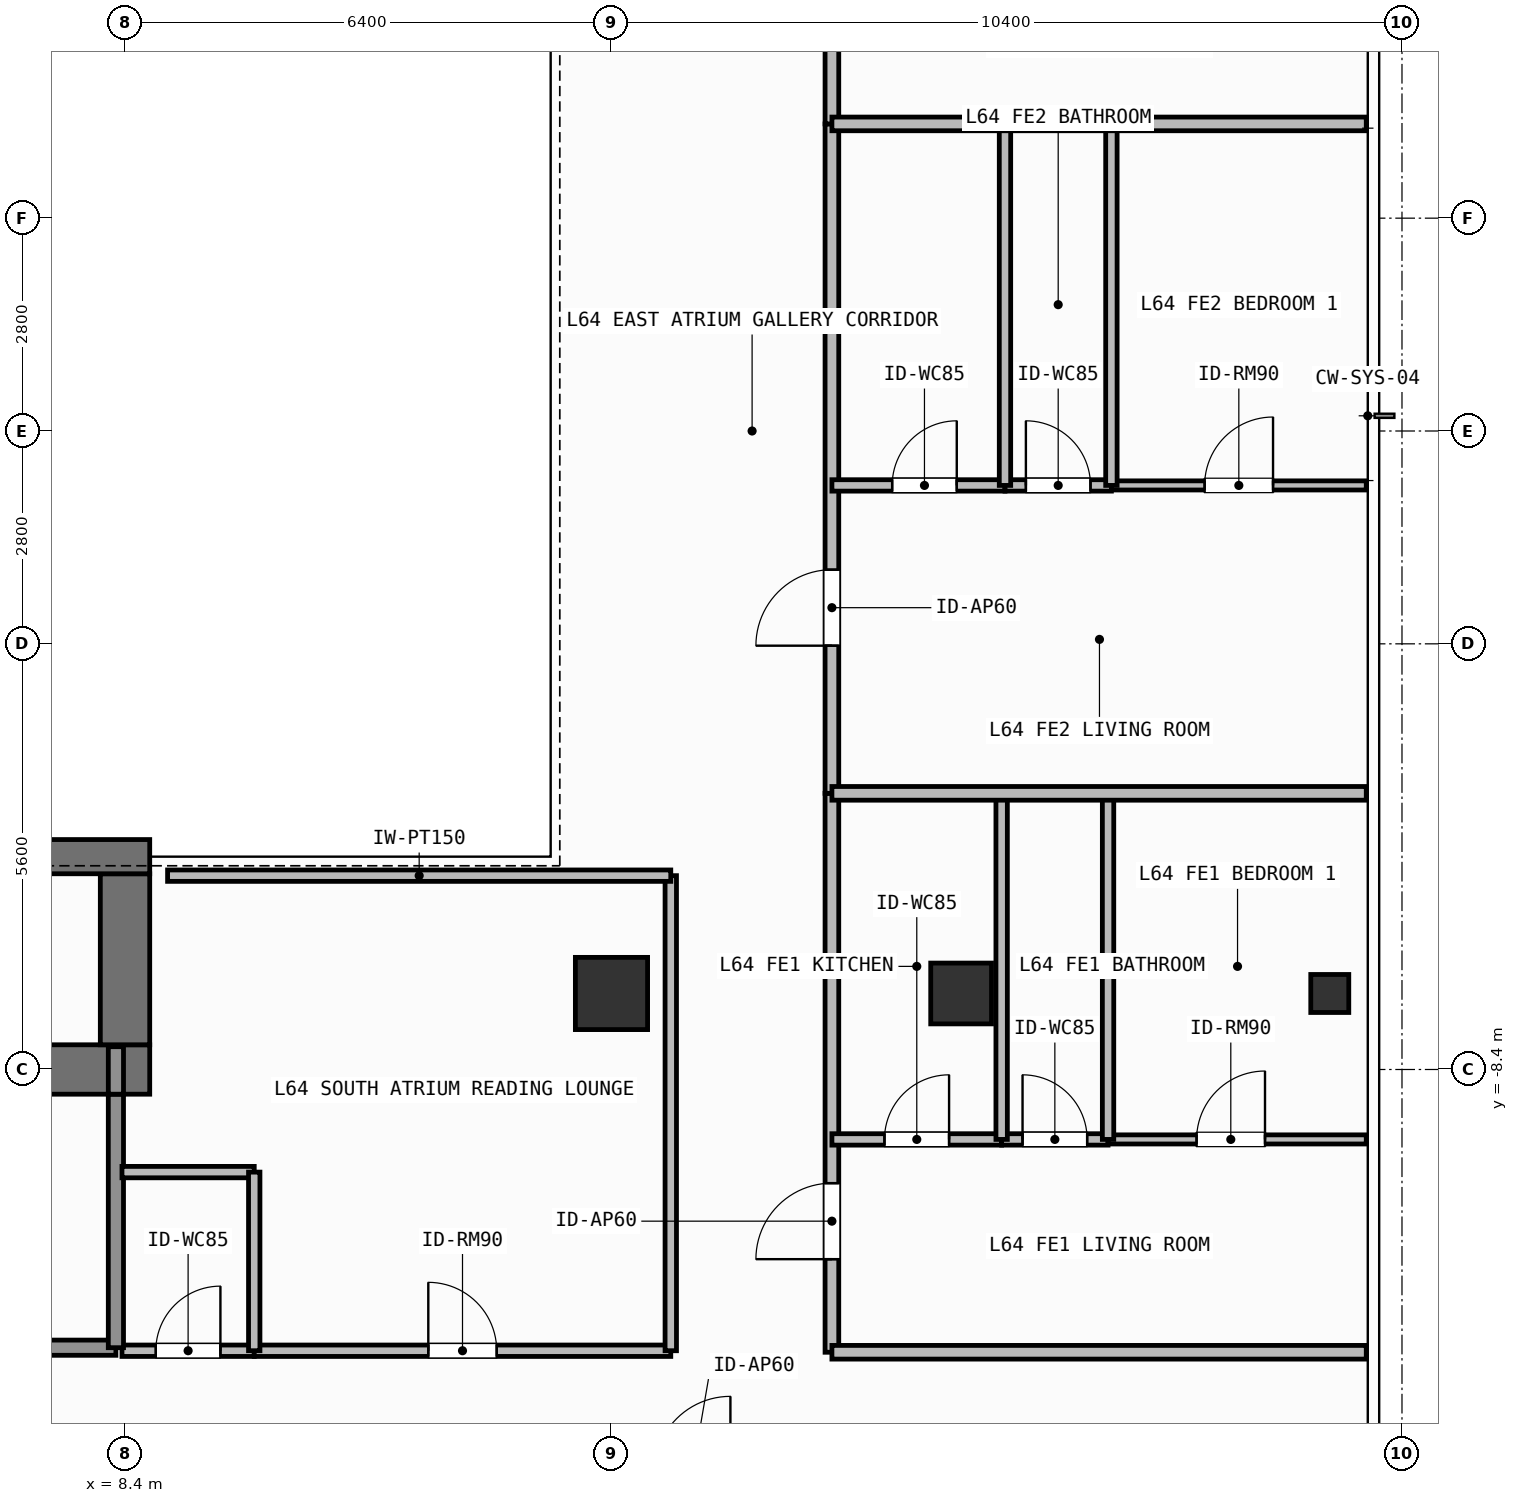
"""IFC4 building model, lengths in metres.
Left out: names, types, materials, properties, quantities, classifications, styles, units other than length and angle.
Written with IfcOpenShell. Run it as: python <this file> out.ifc"""

import sys

from ifc_helpers import new_model, si_unit, direction, frame, frame_2d, origin, origin_2d, place, context, subcontext, project, spatial, rectangle, hollow_rectangle, extrude, element, fill, save


model = new_model("IFC4")
c1 = context("Model", 3, precision=1e-05, world=origin(), true_north=direction((0.0, 1.0)))
c2 = subcontext(c1, "Body", "Model", "MODEL_VIEW")
j1 = project(units=[si_unit("LENGTHUNIT", "METRE"), si_unit("PLANEANGLEUNIT", "RADIAN")], contexts=[c1])
p1 = place(None, origin())
s1 = spatial("IfcSite", under=j1, at=p1, CompositionType="ELEMENT")
p2 = place(p1, origin())
s2 = spatial("IfcBuilding", under=s1, at=p2, CompositionType="ELEMENT")
p3 = place(p2, frame((0.0, 0.0, 262.5)))
s3 = spatial("IfcBuildingStorey", under=s2, at=p3, CompositionType="ELEMENT", Elevation=262.5)
p4 = place(p3, frame((6.12, -8.4, 0.0), z_axis=(0.0, 0.0, 1.0), x_axis=(1.0, 0.0, 0.0)))
e1 = element("IfcWall", 1, at=p4, inside=s3, PredefinedType="SHEAR", context=c2, shape_type="SweptSolid", body=[
    extrude(rectangle(XDim=2.605, YDim=0.65, at=frame_2d((1.302, 0.0))), origin(), (0.0, 0.0, 1.0), 3.9),
])
p5 = place(p3, frame((8.4, -8.075, 0.0), z_axis=(0.0, 0.0, 1.0), x_axis=(0.0, 1.0, 0.0)))
e2 = element("IfcWall", 2, at=p5, inside=s3, PredefinedType="SHEAR", context=c2, shape_type="SweptSolid", body=[
    extrude(rectangle(XDim=2.25, YDim=0.65, at=frame_2d((1.125, 0.0))), origin(), (0.0, 0.0, 1.0), 3.9),
])
p6 = place(p3, frame((3.045, -5.6, 0.0), z_axis=(0.0, 0.0, 1.0), x_axis=(1.0, 0.0, 0.0)))
e3 = element("IfcWall", 3, at=p6, inside=s3, PredefinedType="SHEAR", context=c2, shape_type="SweptSolid", body=[
    extrude(rectangle(XDim=5.68, YDim=0.45, at=frame_2d((2.84, 0.0))), origin(), (0.0, 0.0, 1.0), 3.9),
])
p7 = place(p3, frame((14.8, -7.4, 0.0), z_axis=(0.0, 0.0, 1.0), x_axis=(1.0, 0.0, 0.0)))
e4 = element("IfcColumn", 4, at=p7, inside=s3, PredefinedType="COLUMN", context=c2, shape_type="SweptSolid", body=[
    extrude(rectangle(XDim=0.95, YDim=0.95, at=origin_2d()), origin(), (0.0, 0.0, 1.0), 3.9),
])
p8 = place(p3, frame((19.4, -7.4, 0.0), z_axis=(0.0, 0.0, 1.0), x_axis=(1.0, 0.0, 0.0)))
e5 = element("IfcColumn", 5, at=p8, inside=s3, PredefinedType="COLUMN", context=c2, shape_type="SweptSolid", body=[
    extrude(hollow_rectangle(XDim=0.8, YDim=0.8, WallThickness=0.036, at=origin_2d()), origin(), (0.0, 0.0, 1.0), 3.9),
])
p9 = place(p3, frame((24.25, -7.4, 0.0), z_axis=(0.0, 0.0, 1.0), x_axis=(1.0, 0.0, 0.0)))
e6 = element("IfcColumn", 6, at=p9, inside=s3, PredefinedType="COLUMN", context=c2, shape_type="SweptSolid", body=[
    extrude(hollow_rectangle(XDim=0.5, YDim=0.5, WallThickness=0.025, at=origin_2d()), origin(), (0.0, 0.0, 1.0), 3.9),
])
p10 = place(p3, frame((4.58, -12.06, 0.0), z_axis=(0.0, 0.0, 1.0), x_axis=(1.0, 0.0, 0.0)))
e7 = element("IfcWall", 7, at=p10, inside=s3, PredefinedType="SOLIDWALL", context=c2, shape_type="SweptSolid", body=[
    extrude(rectangle(XDim=3.7, YDim=0.2, at=frame_2d((1.85, 0.0))), origin(), (0.0, 0.0, 1.0), 3.68),
])
p11 = place(p10, frame((1.212, 0.0, 0.0)))
e8 = element("IfcOpeningElement", 8, at=p11, cuts=e7, PredefinedType="OPENING", context=c2, shape_type="SweptSolid", body=[
    extrude(rectangle(XDim=1.1, YDim=2.15, at=frame_2d((0.55, 1.075))), frame((0.0, 0.11, 0.0), z_axis=(0.0, -1.0, 0.0), x_axis=(1.0, 0.0, 0.0)), (0.0, 0.0, 1.0), 0.22),
])
p12 = place(p3, frame((8.36, -12.1, 0.0), z_axis=(0.0, 0.0, 1.0), x_axis=(1.0, 0.0, 0.0)))
e9 = element("IfcWall", 9, at=p12, inside=s3, PredefinedType="PARTITIONING", context=c2, shape_type="SweptSolid", body=[
    extrude(rectangle(XDim=1.74, YDim=0.15, at=frame_2d((0.87, 0.0))), origin(), (0.0, 0.0, 1.0), 3.68),
])
p13 = place(p12, frame((0.445, 0.0, 0.0)))
e10 = element("IfcOpeningElement", 10, at=p13, cuts=e9, PredefinedType="OPENING", context=c2, shape_type="SweptSolid", body=[
    extrude(rectangle(XDim=0.85, YDim=2.1, at=frame_2d((0.425, 1.05))), frame((0.0, 0.085, 0.0), z_axis=(0.0, -1.0, 0.0), x_axis=(1.0, 0.0, 0.0)), (0.0, 0.0, 1.0), 0.17),
])
p14 = place(p3, frame((10.1, -12.1, 0.0), z_axis=(0.0, 0.0, 1.0), x_axis=(1.0, 0.0, 0.0)))
e11 = element("IfcWall", 11, at=p14, inside=s3, PredefinedType="PARTITIONING", context=c2, shape_type="SweptSolid", body=[
    extrude(rectangle(XDim=5.48, YDim=0.15, at=frame_2d((2.74, 0.0))), origin(), (0.0, 0.0, 1.0), 3.68),
])
p15 = place(p14, frame((2.29, 0.0, 0.0)))
e12 = element("IfcOpeningElement", 12, at=p15, cuts=e11, PredefinedType="OPENING", context=c2, shape_type="SweptSolid", body=[
    extrude(rectangle(XDim=0.9, YDim=2.1, at=frame_2d((0.45, 1.05))), frame((0.0, 0.085, 0.0), z_axis=(0.0, -1.0, 0.0), x_axis=(1.0, 0.0, 0.0)), (0.0, 0.0, 1.0), 0.17),
])
p16 = place(p3, frame((17.7, -12.12, 0.0), z_axis=(0.0, 0.0, 1.0), x_axis=(0.0, 1.0, 0.0)))
e13 = element("IfcWall", 13, at=p16, inside=s3, PredefinedType="PARTITIONING", context=c2, shape_type="SweptSolid", body=[
    extrude(rectangle(XDim=7.353, YDim=0.18, at=frame_2d((3.677, 0.0))), origin(), (0.0, 0.0, 1.0), 3.68),
])
p17 = place(p16, frame((1.225, 0.0, 0.0)))
e14 = element("IfcOpeningElement", 14, at=p17, cuts=e13, PredefinedType="OPENING", context=c2, shape_type="SweptSolid", body=[
    extrude(rectangle(XDim=1.0, YDim=2.2, at=frame_2d((0.5, 1.1))), frame((0.0, 0.1, 0.0), z_axis=(0.0, -1.0, 0.0), x_axis=(1.0, 0.0, 0.0)), (0.0, 0.0, 1.0), 0.2),
])
p18 = place(p3, frame((17.7, -9.32, 0.0), z_axis=(0.0, 0.0, 1.0), x_axis=(1.0, 0.0, 0.0)))
e15 = element("IfcWall", 15, at=p18, inside=s3, PredefinedType="PARTITIONING", context=c2, shape_type="SweptSolid", body=[
    extrude(rectangle(XDim=2.233, YDim=0.15, at=frame_2d((1.117, 0.0))), origin(), (0.0, 0.0, 1.0), 3.68),
])
p19 = place(p18, frame((0.691, 0.0, 0.0)))
e16 = element("IfcOpeningElement", 16, at=p19, cuts=e15, PredefinedType="OPENING", context=c2, shape_type="SweptSolid", body=[
    extrude(rectangle(XDim=0.85, YDim=2.1, at=frame_2d((0.425, 1.05))), frame((0.0, 0.085, 0.0), z_axis=(0.0, -1.0, 0.0), x_axis=(1.0, 0.0, 0.0)), (0.0, 0.0, 1.0), 0.17),
])
p20 = place(p3, frame((19.933, -9.32, 0.0), z_axis=(0.0, 0.0, 1.0), x_axis=(1.0, 0.0, 0.0)))
e17 = element("IfcWall", 17, at=p20, inside=s3, PredefinedType="PARTITIONING", context=c2, shape_type="SweptSolid", body=[
    extrude(rectangle(XDim=1.4, YDim=0.15, at=frame_2d((0.7, 0.0))), origin(), (0.0, 0.0, 1.0), 3.68),
])
p21 = place(p20, frame((0.275, 0.0, 0.0)))
e18 = element("IfcOpeningElement", 18, at=p21, cuts=e17, PredefinedType="OPENING", context=c2, shape_type="SweptSolid", body=[
    extrude(rectangle(XDim=0.85, YDim=2.1, at=frame_2d((0.425, 1.05))), frame((0.0, 0.085, 0.0), z_axis=(0.0, -1.0, 0.0), x_axis=(1.0, 0.0, 0.0)), (0.0, 0.0, 1.0), 0.17),
])
p22 = place(p3, frame((21.333, -9.32, 0.0), z_axis=(0.0, 0.0, 1.0), x_axis=(1.0, 0.0, 0.0)))
e19 = element("IfcWall", 19, at=p22, inside=s3, PredefinedType="PARTITIONING", context=c2, shape_type="SweptSolid", body=[
    extrude(rectangle(XDim=3.397, YDim=0.12, at=frame_2d((1.698, 0.0))), origin(), (0.0, 0.0, 1.0), 3.68),
])
p23 = place(p22, frame((1.165, 0.0, 0.0)))
e20 = element("IfcOpeningElement", 20, at=p23, cuts=e19, PredefinedType="OPENING", context=c2, shape_type="SweptSolid", body=[
    extrude(rectangle(XDim=0.9, YDim=2.1, at=frame_2d((0.45, 1.05))), frame((0.0, 0.07, 0.0), z_axis=(0.0, -1.0, 0.0), x_axis=(1.0, 0.0, 0.0)), (0.0, 0.0, 1.0), 0.14),
])
p24 = place(p3, frame((17.7, -4.767, 0.0), z_axis=(0.0, 0.0, 1.0), x_axis=(0.0, 1.0, 0.0)))
e21 = element("IfcWall", 21, at=p24, inside=s3, PredefinedType="PARTITIONING", context=c2, shape_type="SweptSolid", body=[
    extrude(rectangle(XDim=8.807, YDim=0.18, at=frame_2d((4.404, 0.0))), origin(), (0.0, 0.0, 1.0), 3.68),
])
p25 = place(p24, frame((1.943, 0.0, 0.0)))
e22 = element("IfcOpeningElement", 22, at=p25, cuts=e21, PredefinedType="OPENING", context=c2, shape_type="SweptSolid", body=[
    extrude(rectangle(XDim=1.0, YDim=2.2, at=frame_2d((0.5, 1.1))), frame((0.0, 0.1, 0.0), z_axis=(0.0, -1.0, 0.0), x_axis=(1.0, 0.0, 0.0)), (0.0, 0.0, 1.0), 0.2),
])
p26 = place(p3, frame((17.7, -0.716, 0.0), z_axis=(0.0, 0.0, 1.0), x_axis=(1.0, 0.0, 0.0)))
e23 = element("IfcWall", 23, at=p26, inside=s3, PredefinedType="PARTITIONING", context=c2, shape_type="SweptSolid", body=[
    extrude(rectangle(XDim=2.277, YDim=0.15, at=frame_2d((1.139, 0.0))), origin(), (0.0, 0.0, 1.0), 3.68),
])
p27 = place(p26, frame((0.792, 0.0, 0.0)))
e24 = element("IfcOpeningElement", 24, at=p27, cuts=e23, PredefinedType="OPENING", context=c2, shape_type="SweptSolid", body=[
    extrude(rectangle(XDim=0.85, YDim=2.1, at=frame_2d((0.425, 1.05))), frame((0.0, 0.085, 0.0), z_axis=(0.0, -1.0, 0.0), x_axis=(1.0, 0.0, 0.0)), (0.0, 0.0, 1.0), 0.17),
])
p28 = place(p3, frame((19.977, -0.716, 0.0), z_axis=(0.0, 0.0, 1.0), x_axis=(1.0, 0.0, 0.0)))
e25 = element("IfcWall", 25, at=p28, inside=s3, PredefinedType="PARTITIONING", context=c2, shape_type="SweptSolid", body=[
    extrude(rectangle(XDim=1.4, YDim=0.15, at=frame_2d((0.7, 0.0))), origin(), (0.0, 0.0, 1.0), 3.68),
])
p29 = place(p28, frame((0.275, 0.0, 0.0)))
e26 = element("IfcOpeningElement", 26, at=p29, cuts=e25, PredefinedType="OPENING", context=c2, shape_type="SweptSolid", body=[
    extrude(rectangle(XDim=0.85, YDim=2.1, at=frame_2d((0.425, 1.05))), frame((0.0, 0.085, 0.0), z_axis=(0.0, -1.0, 0.0), x_axis=(1.0, 0.0, 0.0)), (0.0, 0.0, 1.0), 0.17),
])
p30 = place(p3, frame((21.377, -0.716, 0.0), z_axis=(0.0, 0.0, 1.0), x_axis=(1.0, 0.0, 0.0)))
e27 = element("IfcWall", 27, at=p30, inside=s3, PredefinedType="PARTITIONING", context=c2, shape_type="SweptSolid", body=[
    extrude(rectangle(XDim=3.353, YDim=0.12, at=frame_2d((1.677, 0.0))), origin(), (0.0, 0.0, 1.0), 3.68),
])
p31 = place(p30, frame((1.227, 0.0, 0.0)))
e28 = element("IfcOpeningElement", 28, at=p31, cuts=e27, PredefinedType="OPENING", context=c2, shape_type="SweptSolid", body=[
    extrude(rectangle(XDim=0.9, YDim=2.1, at=frame_2d((0.45, 1.05))), frame((0.0, 0.07, 0.0), z_axis=(0.0, -1.0, 0.0), x_axis=(1.0, 0.0, 0.0)), (0.0, 0.0, 1.0), 0.14),
])
p32 = place(p3, frame((17.7, 4.04, 0.0), z_axis=(0.0, 0.0, 1.0), x_axis=(0.0, 1.0, 0.0)))
e29 = element("IfcWall", 29, at=p32, inside=s3, PredefinedType="PARTITIONING", context=c2, shape_type="SweptSolid", body=[
    extrude(rectangle(XDim=8.08, YDim=0.18, at=frame_2d((4.04, 0.0))), origin(), (0.0, 0.0, 1.0), 3.68),
])
p33 = place(p32, frame((1.761, 0.0, 0.0)))
e30 = element("IfcOpeningElement", 30, at=p33, cuts=e29, PredefinedType="OPENING", context=c2, shape_type="SweptSolid", body=[
    extrude(rectangle(XDim=1.0, YDim=2.2, at=frame_2d((0.5, 1.1))), frame((0.0, 0.1, 0.0), z_axis=(0.0, -1.0, 0.0), x_axis=(1.0, 0.0, 0.0)), (0.0, 0.0, 1.0), 0.2),
])
p34 = place(p3, frame((8.28, -12.06, 0.0), z_axis=(0.0, 0.0, 1.0), x_axis=(0.0, 1.0, 0.0)))
e31 = element("IfcWall", 31, at=p34, inside=s3, PredefinedType="SOLIDWALL", context=c2, shape_type="SweptSolid", body=[
    extrude(rectangle(XDim=3.335, YDim=0.2, at=frame_2d((1.667, 0.0))), origin(), (0.0, 0.0, 1.0), 3.68),
])
p35 = place(p3, frame((8.28, -8.725, 0.0), z_axis=(0.0, 0.0, 1.0), x_axis=(0.0, 1.0, 0.0)))
e32 = element("IfcWall", 32, at=p35, inside=s3, PredefinedType="SOLIDWALL", context=c2, shape_type="SweptSolid", body=[
    extrude(rectangle(XDim=0.625, YDim=0.2, at=frame_2d((0.312, 0.0))), origin(), (0.0, 0.0, 1.0), 3.68),
])
p36 = place(p3, frame((8.36, -9.75, 0.0), z_axis=(0.0, 0.0, 1.0), x_axis=(1.0, 0.0, 0.0)))
e33 = element("IfcWall", 33, at=p36, inside=s3, PredefinedType="PARTITIONING", context=c2, shape_type="SweptSolid", body=[
    extrude(rectangle(XDim=1.74, YDim=0.15, at=frame_2d((0.87, 0.0))), origin(), (0.0, 0.0, 1.0), 3.68),
])
p37 = place(p3, frame((10.1, -12.1, 0.0), z_axis=(0.0, 0.0, 1.0), x_axis=(0.0, 1.0, 0.0)))
e34 = element("IfcWall", 34, at=p37, inside=s3, PredefinedType="PARTITIONING", context=c2, shape_type="SweptSolid", body=[
    extrude(rectangle(XDim=2.35, YDim=0.15, at=frame_2d((1.175, 0.0))), origin(), (0.0, 0.0, 1.0), 3.68),
])
p38 = place(p3, frame((15.58, -12.1, 0.0), z_axis=(0.0, 0.0, 1.0), x_axis=(0.0, 1.0, 0.0)))
e35 = element("IfcWall", 35, at=p38, inside=s3, PredefinedType="PARTITIONING", context=c2, shape_type="SweptSolid", body=[
    extrude(rectangle(XDim=6.25, YDim=0.15, at=frame_2d((3.125, 0.0))), origin(), (0.0, 0.0, 1.0), 3.68),
])
p39 = place(p3, frame((8.96, -5.85, 0.0), z_axis=(0.0, 0.0, 1.0), x_axis=(1.0, 0.0, 0.0)))
e36 = element("IfcWall", 36, at=p39, inside=s3, PredefinedType="PARTITIONING", context=c2, shape_type="SweptSolid", body=[
    extrude(rectangle(XDim=6.62, YDim=0.15, at=frame_2d((3.31, 0.0))), origin(), (0.0, 0.0, 1.0), 3.68),
])
for number, where, z_axis, x_axis in (
    (37, (19.933, -9.32, 0.0), (0.0, 0.0, 1.0), (0.0, 1.0, 0.0)),
    (38, (21.333, -9.32, 0.0), (0.0, 0.0, 1.0), (0.0, 1.0, 0.0)),
):
    element("IfcWall", number, at=place(p3, frame(where, z_axis=z_axis, x_axis=x_axis)), inside=s3, PredefinedType="PARTITIONING", context=c2, shape_type="SweptSolid", body=[
        extrude(rectangle(XDim=4.553, YDim=0.15, at=frame_2d((2.276, 0.0))), origin(), (0.0, 0.0, 1.0), 3.68),
    ])
for number, where, z_axis, x_axis in (
    (39, (19.977, -0.716, 0.0), (0.0, 0.0, 1.0), (0.0, 1.0, 0.0)),
    (40, (21.377, -0.716, 0.0), (0.0, 0.0, 1.0), (0.0, 1.0, 0.0)),
):
    element("IfcWall", number, at=place(p3, frame(where, z_axis=z_axis, x_axis=x_axis)), inside=s3, PredefinedType="PARTITIONING", context=c2, shape_type="SweptSolid", body=[
        extrude(rectangle(XDim=4.756, YDim=0.15, at=frame_2d((2.378, 0.0))), origin(), (0.0, 0.0, 1.0), 3.68),
    ])
for number, where, z_axis, x_axis in (
    (41, (17.7, -4.767, 0.0), (0.0, 0.0, 1.0), (1.0, 0.0, 0.0)),
    (42, (17.7, 4.04, 0.0), (0.0, 0.0, 1.0), (1.0, 0.0, 0.0)),
    (43, (17.7, -12.12, 0.0), (0.0, 0.0, 1.0), (1.0, 0.0, 0.0)),
):
    element("IfcWall", number, at=place(p3, frame(where, z_axis=z_axis, x_axis=x_axis)), inside=s3, PredefinedType="PARTITIONING", context=c2, shape_type="SweptSolid", body=[
        extrude(rectangle(XDim=7.03, YDim=0.18, at=frame_2d((3.515, 0.0))), origin(), (0.0, 0.0, 1.0), 3.68),
    ])
p40 = place(p13, origin())
e44 = element("IfcDoor", 44, at=p40, inside=s3, OperationType="SINGLE_SWING_RIGHT", PredefinedType="DOOR", context=c2, shape_type="SweptSolid", body=[
    extrude(rectangle(XDim=0.85, YDim=2.1, at=frame_2d((0.425, 1.05))), frame((0.0, 0.025, 0.0), z_axis=(0.0, -1.0, 0.0), x_axis=(1.0, 0.0, 0.0)), (0.0, 0.0, 1.0), 0.05),
])
fill(e10, e44)
p41 = place(p15, origin())
e45 = element("IfcDoor", 45, at=p41, inside=s3, OperationType="SINGLE_SWING_LEFT", PredefinedType="DOOR", context=c2, shape_type="SweptSolid", body=[
    extrude(rectangle(XDim=0.9, YDim=2.1, at=frame_2d((0.45, 1.05))), frame((0.0, 0.025, 0.0), z_axis=(0.0, -1.0, 0.0), x_axis=(1.0, 0.0, 0.0)), (0.0, 0.0, 1.0), 0.05),
])
fill(e12, e45)
p42 = place(p17, origin())
e46 = element("IfcDoor", 46, at=p42, inside=s3, OperationType="SINGLE_SWING_LEFT", PredefinedType="DOOR", context=c2, shape_type="SweptSolid", body=[
    extrude(rectangle(XDim=1.0, YDim=2.2, at=frame_2d((0.5, 1.1))), frame((0.0, 0.025, 0.0), z_axis=(0.0, -1.0, 0.0), x_axis=(1.0, 0.0, 0.0)), (0.0, 0.0, 1.0), 0.05),
])
fill(e14, e46)
p43 = place(p19, origin())
e47 = element("IfcDoor", 47, at=p43, inside=s3, OperationType="SINGLE_SWING_RIGHT", PredefinedType="DOOR", context=c2, shape_type="SweptSolid", body=[
    extrude(rectangle(XDim=0.85, YDim=2.1, at=frame_2d((0.425, 1.05))), frame((0.0, 0.025, 0.0), z_axis=(0.0, -1.0, 0.0), x_axis=(1.0, 0.0, 0.0)), (0.0, 0.0, 1.0), 0.05),
])
fill(e16, e47)
p44 = place(p21, origin())
e48 = element("IfcDoor", 48, at=p44, inside=s3, OperationType="SINGLE_SWING_LEFT", PredefinedType="DOOR", context=c2, shape_type="SweptSolid", body=[
    extrude(rectangle(XDim=0.85, YDim=2.1, at=frame_2d((0.425, 1.05))), frame((0.0, 0.025, 0.0), z_axis=(0.0, -1.0, 0.0), x_axis=(1.0, 0.0, 0.0)), (0.0, 0.0, 1.0), 0.05),
])
fill(e18, e48)
p45 = place(p23, origin())
e49 = element("IfcDoor", 49, at=p45, inside=s3, OperationType="SINGLE_SWING_RIGHT", PredefinedType="DOOR", context=c2, shape_type="SweptSolid", body=[
    extrude(rectangle(XDim=0.9, YDim=2.1, at=frame_2d((0.45, 1.05))), frame((0.0, 0.025, 0.0), z_axis=(0.0, -1.0, 0.0), x_axis=(1.0, 0.0, 0.0)), (0.0, 0.0, 1.0), 0.05),
])
fill(e20, e49)
p46 = place(p25, origin())
e50 = element("IfcDoor", 50, at=p46, inside=s3, OperationType="SINGLE_SWING_LEFT", PredefinedType="DOOR", context=c2, shape_type="SweptSolid", body=[
    extrude(rectangle(XDim=1.0, YDim=2.2, at=frame_2d((0.5, 1.1))), frame((0.0, 0.025, 0.0), z_axis=(0.0, -1.0, 0.0), x_axis=(1.0, 0.0, 0.0)), (0.0, 0.0, 1.0), 0.05),
])
fill(e22, e50)
p47 = place(p27, origin())
e51 = element("IfcDoor", 51, at=p47, inside=s3, OperationType="SINGLE_SWING_RIGHT", PredefinedType="DOOR", context=c2, shape_type="SweptSolid", body=[
    extrude(rectangle(XDim=0.85, YDim=2.1, at=frame_2d((0.425, 1.05))), frame((0.0, 0.025, 0.0), z_axis=(0.0, -1.0, 0.0), x_axis=(1.0, 0.0, 0.0)), (0.0, 0.0, 1.0), 0.05),
])
fill(e24, e51)
p48 = place(p29, origin())
e52 = element("IfcDoor", 52, at=p48, inside=s3, OperationType="SINGLE_SWING_LEFT", PredefinedType="DOOR", context=c2, shape_type="SweptSolid", body=[
    extrude(rectangle(XDim=0.85, YDim=2.1, at=frame_2d((0.425, 1.05))), frame((0.0, 0.025, 0.0), z_axis=(0.0, -1.0, 0.0), x_axis=(1.0, 0.0, 0.0)), (0.0, 0.0, 1.0), 0.05),
])
fill(e26, e52)
p49 = place(p31, origin())
e53 = element("IfcDoor", 53, at=p49, inside=s3, OperationType="SINGLE_SWING_RIGHT", PredefinedType="DOOR", context=c2, shape_type="SweptSolid", body=[
    extrude(rectangle(XDim=0.9, YDim=2.1, at=frame_2d((0.45, 1.05))), frame((0.0, 0.025, 0.0), z_axis=(0.0, -1.0, 0.0), x_axis=(1.0, 0.0, 0.0)), (0.0, 0.0, 1.0), 0.05),
])
fill(e28, e53)
save(model, sys.argv[1])
